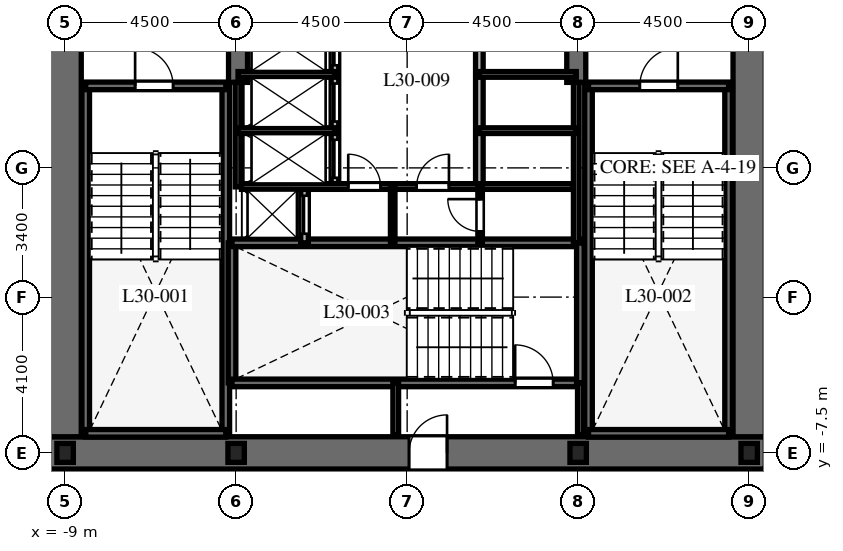
"""IFC4 building model, lengths in metres.
Left out: names, types, materials, properties, quantities, classifications, styles, units other than length and angle.
Written with IfcOpenShell. Run it as: python <this file> out.ifc"""

import sys

from ifc_helpers import new_model, si_unit, direction, frame, frame_2d, origin, origin_2d, place, context, subcontext, project, spatial, rectangle, i_section, extrude, element, fill, save


model = new_model("IFC4")
c1 = context("Model", 3, precision=1e-05, world=origin(), true_north=direction((0.0, 1.0)))
c2 = subcontext(c1, "Body", "Model", "MODEL_VIEW")
j1 = project(units=[si_unit("LENGTHUNIT", "METRE"), si_unit("PLANEANGLEUNIT", "RADIAN")], contexts=[c1])
p1 = place(None, origin())
s1 = spatial("IfcSite", under=j1, at=p1, CompositionType="ELEMENT")
p2 = place(p1, origin())
s2 = spatial("IfcBuilding", under=s1, at=p2, CompositionType="ELEMENT")
p3 = place(p2, frame((0.0, 0.0, 124.7)))
s3 = spatial("IfcBuildingStorey", under=s2, at=p3, CompositionType="ELEMENT", Elevation=124.7)
p4 = place(p3, frame((-9.425, -7.5, 0.0), z_axis=(0.0, 0.0, 1.0), x_axis=(1.0, 0.0, 0.0)))
e1 = element("IfcWall", 1, at=p4, inside=s3, PredefinedType="SHEAR", context=c2, shape_type="SweptSolid", body=[
    extrude(rectangle(XDim=18.85, YDim=0.85, at=frame_2d((9.425, 0.0))), origin(), (0.0, 0.0, 1.0), 3.7),
])
p5 = place(p4, frame((9.475, 0.0, 0.0)))
e2 = element("IfcOpeningElement", 2, at=p5, cuts=e1, PredefinedType="OPENING", context=c2, shape_type="SweptSolid", body=[
    extrude(rectangle(XDim=1.0, YDim=2.15, at=frame_2d((0.5, 1.075))), frame((0.0, 0.435, 0.0), z_axis=(0.0, -1.0, 0.0), x_axis=(1.0, 0.0, 0.0)), (0.0, 0.0, 1.0), 0.87),
])
p6 = place(p3, frame((-9.0, -7.075, 0.0), z_axis=(0.0, 0.0, 1.0), x_axis=(0.0, 1.0, 0.0)))
e3 = element("IfcWall", 3, at=p6, inside=s3, PredefinedType="SHEAR", context=c2, shape_type="SweptSolid", body=[
    extrude(rectangle(XDim=14.15, YDim=0.85, at=frame_2d((7.075, 0.0))), origin(), (0.0, 0.0, 1.0), 3.7),
])
p7 = place(p6, frame((10.2, 0.0, 0.0)))
e4 = element("IfcOpeningElement", 4, at=p7, cuts=e3, PredefinedType="OPENING", context=c2, shape_type="SweptSolid", body=[
    extrude(rectangle(XDim=1.05, YDim=2.15, at=frame_2d((0.525, 1.075))), frame((0.0, 0.435, 0.0), z_axis=(0.0, -1.0, 0.0), x_axis=(1.0, 0.0, 0.0)), (0.0, 0.0, 1.0), 0.87),
])
p8 = place(p3, frame((9.0, -7.075, 0.0), z_axis=(0.0, 0.0, 1.0), x_axis=(0.0, 1.0, 0.0)))
e5 = element("IfcWall", 5, at=p8, inside=s3, PredefinedType="SHEAR", context=c2, shape_type="SweptSolid", body=[
    extrude(rectangle(XDim=14.15, YDim=0.85, at=frame_2d((7.075, 0.0))), origin(), (0.0, 0.0, 1.0), 3.7),
])
p9 = place(p8, frame((10.2, 0.0, 0.0)))
e6 = element("IfcOpeningElement", 6, at=p9, cuts=e5, PredefinedType="OPENING", context=c2, shape_type="SweptSolid", body=[
    extrude(rectangle(XDim=1.05, YDim=2.15, at=frame_2d((0.525, 1.075))), frame((0.0, 0.435, 0.0), z_axis=(0.0, -1.0, 0.0), x_axis=(1.0, 0.0, 0.0)), (0.0, 0.0, 1.0), 0.87),
])
for number, where, z_axis, x_axis in (
    (7, (-4.45, 2.25, 0.0), (0.0, 0.0, 1.0), (0.0, 1.0, 0.0)),
    (8, (4.45, 2.25, 0.0), (0.0, 0.0, 1.0), (0.0, 1.0, 0.0)),
):
    element("IfcWall", number, at=place(p3, frame(where, z_axis=z_axis, x_axis=x_axis)), inside=s3, PredefinedType="SHEAR", context=c2, shape_type="SweptSolid", body=[
        extrude(rectangle(XDim=4.825, YDim=0.5, at=frame_2d((2.413, 0.0))), origin(), (0.0, 0.0, 1.0), 3.7),
    ])
for number, where, z_axis, x_axis in (
    (9, (-8.458, -6.985, 0.0), (0.0, 0.0, 1.0), (0.0, 1.0, 0.0)),
    (10, (-4.772, -6.985, 0.0), (0.0, 0.0, 1.0), (0.0, 1.0, 0.0)),
):
    element("IfcWall", number, at=place(p3, frame(where, z_axis=z_axis, x_axis=x_axis)), inside=s3, PredefinedType="SHEAR", context=c2, shape_type="SweptSolid", body=[
        extrude(rectangle(XDim=9.143, YDim=0.2, at=frame_2d((4.572, 0.0))), origin(), (0.0, 0.0, 1.0), 3.7),
    ])
p10 = place(p3, frame((-8.458, -6.985, 0.0), z_axis=(0.0, 0.0, 1.0), x_axis=(1.0, 0.0, 0.0)))
e11 = element("IfcWall", 11, at=p10, inside=s3, PredefinedType="SHEAR", context=c2, shape_type="SweptSolid", body=[
    extrude(rectangle(XDim=3.686, YDim=0.2, at=frame_2d((1.843, 0.0))), origin(), (0.0, 0.0, 1.0), 3.7),
])
p11 = place(p3, frame((-8.458, 2.158, 0.0), z_axis=(0.0, 0.0, 1.0), x_axis=(1.0, 0.0, 0.0)))
e12 = element("IfcWall", 12, at=p11, inside=s3, PredefinedType="SHEAR", context=c2, shape_type="SweptSolid", body=[
    extrude(rectangle(XDim=3.686, YDim=0.2, at=frame_2d((1.843, 0.0))), origin(), (0.0, 0.0, 1.0), 3.7),
])
p12 = place(p11, frame((1.3, 0.0, 0.0)))
e13 = element("IfcOpeningElement", 13, at=p12, cuts=e12, PredefinedType="OPENING", context=c2, shape_type="SweptSolid", body=[
    extrude(rectangle(XDim=1.0, YDim=2.15, at=frame_2d((0.5, 1.075))), frame((0.0, 0.11, 0.0), z_axis=(0.0, -1.0, 0.0), x_axis=(1.0, 0.0, 0.0)), (0.0, 0.0, 1.0), 0.22),
])
for number, where, z_axis, x_axis in (
    (14, (4.772, -6.985, 0.0), (0.0, 0.0, 1.0), (0.0, 1.0, 0.0)),
    (15, (8.458, -6.985, 0.0), (0.0, 0.0, 1.0), (0.0, 1.0, 0.0)),
):
    element("IfcWall", number, at=place(p3, frame(where, z_axis=z_axis, x_axis=x_axis)), inside=s3, PredefinedType="SHEAR", context=c2, shape_type="SweptSolid", body=[
        extrude(rectangle(XDim=9.143, YDim=0.2, at=frame_2d((4.572, 0.0))), origin(), (0.0, 0.0, 1.0), 3.7),
    ])
p13 = place(p3, frame((4.772, -6.985, 0.0), z_axis=(0.0, 0.0, 1.0), x_axis=(1.0, 0.0, 0.0)))
e16 = element("IfcWall", 16, at=p13, inside=s3, PredefinedType="SHEAR", context=c2, shape_type="SweptSolid", body=[
    extrude(rectangle(XDim=3.686, YDim=0.2, at=frame_2d((1.843, 0.0))), origin(), (0.0, 0.0, 1.0), 3.7),
])
p14 = place(p3, frame((4.772, 2.158, 0.0), z_axis=(0.0, 0.0, 1.0), x_axis=(1.0, 0.0, 0.0)))
e17 = element("IfcWall", 17, at=p14, inside=s3, PredefinedType="SHEAR", context=c2, shape_type="SweptSolid", body=[
    extrude(rectangle(XDim=3.686, YDim=0.2, at=frame_2d((1.843, 0.0))), origin(), (0.0, 0.0, 1.0), 3.7),
])
p15 = place(p14, frame((1.35, 0.0, 0.0)))
e18 = element("IfcOpeningElement", 18, at=p15, cuts=e17, PredefinedType="OPENING", context=c2, shape_type="SweptSolid", body=[
    extrude(rectangle(XDim=1.0, YDim=2.15, at=frame_2d((0.5, 1.075))), frame((0.0, 0.11, 0.0), z_axis=(0.0, -1.0, 0.0), x_axis=(1.0, 0.0, 0.0)), (0.0, 0.0, 1.0), 0.22),
])
p16 = place(p3, frame((-4.608, -5.658, 0.0), z_axis=(0.0, 0.0, 1.0), x_axis=(0.0, 1.0, 0.0)))
e19 = element("IfcWall", 19, at=p16, inside=s3, PredefinedType="SHEAR", context=c2, shape_type="SweptSolid", body=[
    extrude(rectangle(XDim=3.686, YDim=0.2, at=frame_2d((1.843, 0.0))), origin(), (0.0, 0.0, 1.0), 3.7),
])
p17 = place(p3, frame((-4.608, -5.658, 0.0), z_axis=(0.0, 0.0, 1.0), x_axis=(1.0, 0.0, 0.0)))
e20 = element("IfcWall", 20, at=p17, inside=s3, PredefinedType="SHEAR", context=c2, shape_type="SweptSolid", body=[
    extrude(rectangle(XDim=9.166, YDim=0.2, at=frame_2d((4.583, 0.0))), origin(), (0.0, 0.0, 1.0), 3.7),
])
p18 = place(p17, frame((7.45, 0.0, 0.0)))
e21 = element("IfcOpeningElement", 21, at=p18, cuts=e20, PredefinedType="OPENING", context=c2, shape_type="SweptSolid", body=[
    extrude(rectangle(XDim=1.0, YDim=2.15, at=frame_2d((0.5, 1.075))), frame((0.0, 0.11, 0.0), z_axis=(0.0, -1.0, 0.0), x_axis=(1.0, 0.0, 0.0)), (0.0, 0.0, 1.0), 0.22),
])
p19 = place(p3, frame((-4.608, -1.972, 0.0), z_axis=(0.0, 0.0, 1.0), x_axis=(1.0, 0.0, 0.0)))
e22 = element("IfcWall", 22, at=p19, inside=s3, PredefinedType="SHEAR", context=c2, shape_type="SweptSolid", body=[
    extrude(rectangle(XDim=9.166, YDim=0.2, at=frame_2d((4.583, 0.0))), origin(), (0.0, 0.0, 1.0), 3.7),
])
p20 = place(p3, frame((4.558, -5.658, 0.0), z_axis=(0.0, 0.0, 1.0), x_axis=(0.0, 1.0, 0.0)))
e23 = element("IfcWall", 23, at=p20, inside=s3, PredefinedType="SHEAR", context=c2, shape_type="SweptSolid", body=[
    extrude(rectangle(XDim=3.686, YDim=0.2, at=frame_2d((1.843, 0.0))), origin(), (0.0, 0.0, 1.0), 3.7),
])
for number, where, z_axis, x_axis in (
    (24, (-9.0, -7.5, 0.0), (0.0, 0.0, 1.0), (1.0, 0.0, 0.0)),
    (25, (-4.5, -7.5, 0.0), (0.0, 0.0, 1.0), (1.0, 0.0, 0.0)),
    (26, (4.5, -7.5, 0.0), (0.0, 0.0, 1.0), (1.0, 0.0, 0.0)),
    (27, (9.0, -7.5, 0.0), (0.0, 0.0, 1.0), (1.0, 0.0, 0.0)),
):
    element("IfcColumn", number, at=place(p3, frame(where, z_axis=z_axis, x_axis=x_axis)), inside=s3, PredefinedType="COLUMN", context=c2, shape_type="SweptSolid", body=[
        extrude(i_section(OverallWidth=0.432, OverallDepth=0.498, WebThickness=0.056, FlangeThickness=0.089, at=origin_2d()), origin(), (0.0, 0.0, 1.0), 3.7),
    ])
for number, where, z_axis, x_axis in (
    (28, (-0.3, -7.02, 0.0), (0.0, 0.0, 1.0), (0.0, 1.0, 0.0)),
    (29, (4.558, -7.02, 0.0), (0.0, 0.0, 1.0), (0.0, 1.0, 0.0)),
):
    element("IfcWall", number, at=place(p3, frame(where, z_axis=z_axis, x_axis=x_axis)), inside=s3, PredefinedType="PARTITIONING", context=c2, shape_type="SweptSolid", body=[
        extrude(rectangle(XDim=1.362, YDim=0.15, at=frame_2d((0.681, 0.0))), origin(), (0.0, 0.0, 1.0), 3.4),
    ])
p21 = place(p3, frame((-2.7, -1.972, 0.0), z_axis=(0.0, 0.0, 1.0), x_axis=(0.0, 1.0, 0.0)))
e30 = element("IfcWall", 30, at=p21, inside=s3, PredefinedType="PARTITIONING", context=c2, shape_type="SweptSolid", body=[
    extrude(rectangle(XDim=1.472, YDim=0.2, at=frame_2d((0.736, 0.0))), origin(), (0.0, 0.0, 1.0), 3.4),
])
p22 = place(p21, frame((0.24, 0.0, 0.0)))
e31 = element("IfcOpeningElement", 31, at=p22, cuts=e30, PredefinedType="OPENING", context=c2, shape_type="SweptSolid", body=[
    extrude(rectangle(XDim=1.0, YDim=2.2, at=frame_2d((0.5, 1.1))), frame((0.0, 0.11, 0.0), z_axis=(0.0, -1.0, 0.0), x_axis=(1.0, 0.0, 0.0)), (0.0, 0.0, 1.0), 0.22),
])
p23 = place(p3, frame((-4.45, -0.5, 0.0), z_axis=(0.0, 0.0, 1.0), x_axis=(0.0, 1.0, 0.0)))
e32 = element("IfcWall", 32, at=p23, inside=s3, PredefinedType="PARTITIONING", context=c2, shape_type="SweptSolid", body=[
    extrude(rectangle(XDim=2.75, YDim=0.15, at=frame_2d((1.375, 0.0))), origin(), (0.0, 0.0, 1.0), 3.4),
])
p24 = place(p3, frame((4.45, -1.972, 0.0), z_axis=(0.0, 0.0, 1.0), x_axis=(0.0, 1.0, 0.0)))
e33 = element("IfcWall", 33, at=p24, inside=s3, PredefinedType="PARTITIONING", context=c2, shape_type="SweptSolid", body=[
    extrude(rectangle(XDim=4.222, YDim=0.15, at=frame_2d((2.111, 0.0))), origin(), (0.0, 0.0, 1.0), 3.4),
])
p25 = place(p3, frame((-1.9, -0.5, 0.0), z_axis=(0.0, 0.0, 1.0), x_axis=(0.0, 1.0, 0.0)))
e34 = element("IfcWall", 34, at=p25, inside=s3, PredefinedType="PARTITIONING", context=c2, shape_type="SweptSolid", body=[
    extrude(rectangle(XDim=4.44, YDim=0.2, at=frame_2d((2.22, 0.0))), origin(), (0.0, 0.0, 1.0), 3.4),
])
p26 = place(p25, frame((0.24, 0.0, 0.0)))
e35 = element("IfcOpeningElement", 35, at=p26, cuts=e34, PredefinedType="OPENING", context=c2, shape_type="SweptSolid", body=[
    extrude(rectangle(XDim=1.0, YDim=2.2, at=frame_2d((0.5, 1.1))), frame((0.0, 0.11, 0.0), z_axis=(0.0, -1.0, 0.0), x_axis=(1.0, 0.0, 0.0)), (0.0, 0.0, 1.0), 0.22),
])
p27 = place(p25, frame((1.72, 0.0, 0.0)))
e36 = element("IfcOpeningElement", 36, at=p27, cuts=e34, PredefinedType="OPENING", context=c2, shape_type="SweptSolid", body=[
    extrude(rectangle(XDim=1.0, YDim=2.2, at=frame_2d((0.5, 1.1))), frame((0.0, 0.11, 0.0), z_axis=(0.0, -1.0, 0.0), x_axis=(1.0, 0.0, 0.0)), (0.0, 0.0, 1.0), 0.22),
])
p28 = place(p25, frame((3.2, 0.0, 0.0)))
e37 = element("IfcOpeningElement", 37, at=p28, cuts=e34, PredefinedType="OPENING", context=c2, shape_type="SweptSolid", body=[
    extrude(rectangle(XDim=1.0, YDim=2.2, at=frame_2d((0.5, 1.1))), frame((0.0, 0.11, 0.0), z_axis=(0.0, -1.0, 0.0), x_axis=(1.0, 0.0, 0.0)), (0.0, 0.0, 1.0), 0.22),
])
for number, where, z_axis, x_axis in (
    (38, (-4.45, 0.98, 0.0), (0.0, 0.0, 1.0), (1.0, 0.0, 0.0)),
    (39, (-4.45, 2.46, 0.0), (0.0, 0.0, 1.0), (1.0, 0.0, 0.0)),
):
    element("IfcWall", number, at=place(p3, frame(where, z_axis=z_axis, x_axis=x_axis)), inside=s3, PredefinedType="PARTITIONING", context=c2, shape_type="SweptSolid", body=[
        extrude(rectangle(XDim=2.55, YDim=0.15, at=frame_2d((1.275, 0.0))), origin(), (0.0, 0.0, 1.0), 3.4),
    ])
p29 = place(p3, frame((1.9, -0.5, 0.0), z_axis=(0.0, 0.0, 1.0), x_axis=(0.0, 1.0, 0.0)))
e40 = element("IfcWall", 40, at=p29, inside=s3, PredefinedType="PARTITIONING", context=c2, shape_type="SweptSolid", body=[
    extrude(rectangle(XDim=4.44, YDim=0.2, at=frame_2d((2.22, 0.0))), origin(), (0.0, 0.0, 1.0), 3.4),
])
for number, where, z_axis, x_axis in (
    (41, (1.9, 0.98, 0.0), (0.0, 0.0, 1.0), (1.0, 0.0, 0.0)),
    (42, (1.9, 2.46, 0.0), (0.0, 0.0, 1.0), (1.0, 0.0, 0.0)),
):
    element("IfcWall", number, at=place(p3, frame(where, z_axis=z_axis, x_axis=x_axis)), inside=s3, PredefinedType="PARTITIONING", context=c2, shape_type="SweptSolid", body=[
        extrude(rectangle(XDim=2.55, YDim=0.15, at=frame_2d((1.275, 0.0))), origin(), (0.0, 0.0, 1.0), 3.4),
    ])
p30 = place(p3, frame((-4.36, -0.49, 0.0), z_axis=(0.0, 0.0, 1.0), x_axis=(1.0, 0.0, 0.0)))
e43 = element("IfcWall", 43, at=p30, inside=s3, PredefinedType="PARTITIONING", context=c2, shape_type="SweptSolid", body=[
    extrude(rectangle(XDim=8.72, YDim=0.15, at=frame_2d((4.36, 0.0))), origin(), (0.0, 0.0, 1.0), 3.4),
])
p31 = place(p30, frame((2.81, 0.0, 0.0)))
e44 = element("IfcOpeningElement", 44, at=p31, cuts=e43, PredefinedType="OPENING", context=c2, shape_type="SweptSolid", body=[
    extrude(rectangle(XDim=0.85, YDim=2.03, at=frame_2d((0.425, 1.015))), frame((0.0, 0.085, 0.0), z_axis=(0.0, -1.0, 0.0), x_axis=(1.0, 0.0, 0.0)), (0.0, 0.0, 1.0), 0.17),
])
p32 = place(p30, frame((4.61, 0.0, 0.0)))
e45 = element("IfcOpeningElement", 45, at=p32, cuts=e43, PredefinedType="OPENING", context=c2, shape_type="SweptSolid", body=[
    extrude(rectangle(XDim=0.85, YDim=2.03, at=frame_2d((0.425, 1.015))), frame((0.0, 0.085, 0.0), z_axis=(0.0, -1.0, 0.0), x_axis=(1.0, 0.0, 0.0)), (0.0, 0.0, 1.0), 0.17),
])
p33 = place(p3, frame((-0.38, -1.972, 0.0), z_axis=(0.0, 0.0, 1.0), x_axis=(0.0, 1.0, 0.0)))
e46 = element("IfcWall", 46, at=p33, inside=s3, PredefinedType="PARTITIONING", context=c2, shape_type="SweptSolid", body=[
    extrude(rectangle(XDim=1.472, YDim=0.12, at=frame_2d((0.736, 0.0))), origin(), (0.0, 0.0, 1.0), 3.4),
])
p34 = place(p3, frame((1.92, -1.972, 0.0), z_axis=(0.0, 0.0, 1.0), x_axis=(0.0, 1.0, 0.0)))
e47 = element("IfcWall", 47, at=p34, inside=s3, PredefinedType="PARTITIONING", context=c2, shape_type="SweptSolid", body=[
    extrude(rectangle(XDim=1.472, YDim=0.12, at=frame_2d((0.736, 0.0))), origin(), (0.0, 0.0, 1.0), 3.4),
])
p35 = place(p34, frame((0.3, 0.0, 0.0)))
e48 = element("IfcOpeningElement", 48, at=p35, cuts=e47, PredefinedType="OPENING", context=c2, shape_type="SweptSolid", body=[
    extrude(rectangle(XDim=0.85, YDim=2.03, at=frame_2d((0.425, 1.015))), frame((0.0, 0.07, 0.0), z_axis=(0.0, -1.0, 0.0), x_axis=(1.0, 0.0, 0.0)), (0.0, 0.0, 1.0), 0.14),
])
p36 = place(p12, origin())
e49 = element("IfcDoor", 49, at=p36, inside=s3, OperationType="SINGLE_SWING_LEFT", PredefinedType="DOOR", context=c2, shape_type="SweptSolid", body=[
    extrude(rectangle(XDim=1.0, YDim=2.15, at=frame_2d((0.5, 1.075))), frame((0.0, 0.025, 0.0), z_axis=(0.0, -1.0, 0.0), x_axis=(1.0, 0.0, 0.0)), (0.0, 0.0, 1.0), 0.05),
])
fill(e13, e49)
p37 = place(p15, origin())
e50 = element("IfcDoor", 50, at=p37, inside=s3, OperationType="SINGLE_SWING_RIGHT", PredefinedType="DOOR", context=c2, shape_type="SweptSolid", body=[
    extrude(rectangle(XDim=1.0, YDim=2.15, at=frame_2d((0.5, 1.075))), frame((0.0, 0.025, 0.0), z_axis=(0.0, -1.0, 0.0), x_axis=(1.0, 0.0, 0.0)), (0.0, 0.0, 1.0), 0.05),
])
fill(e18, e50)
p38 = place(p18, origin())
e51 = element("IfcDoor", 51, at=p38, inside=s3, OperationType="SINGLE_SWING_LEFT", PredefinedType="DOOR", context=c2, shape_type="SweptSolid", body=[
    extrude(rectangle(XDim=1.0, YDim=2.15, at=frame_2d((0.5, 1.075))), frame((0.0, 0.025, 0.0), z_axis=(0.0, -1.0, 0.0), x_axis=(1.0, 0.0, 0.0)), (0.0, 0.0, 1.0), 0.05),
])
fill(e21, e51)
p39 = place(p5, origin())
e52 = element("IfcDoor", 52, at=p39, inside=s3, OperationType="SINGLE_SWING_RIGHT", PredefinedType="DOOR", context=c2, shape_type="SweptSolid", body=[
    extrude(rectangle(XDim=1.0, YDim=2.15, at=frame_2d((0.5, 1.075))), frame((0.0, 0.025, 0.0), z_axis=(0.0, -1.0, 0.0), x_axis=(1.0, 0.0, 0.0)), (0.0, 0.0, 1.0), 0.05),
])
fill(e2, e52)
p40 = place(p22, origin())
e53 = element("IfcDoor", 53, at=p40, inside=s3, OperationType="SLIDING_TO_LEFT", PredefinedType="DOOR", context=c2, shape_type="SweptSolid", body=[
    extrude(rectangle(XDim=1.0, YDim=2.2, at=frame_2d((0.5, 1.1))), frame((0.0, 0.025, 0.0), z_axis=(0.0, -1.0, 0.0), x_axis=(1.0, 0.0, 0.0)), (0.0, 0.0, 1.0), 0.05),
])
fill(e31, e53)
p41 = place(p26, origin())
e54 = element("IfcDoor", 54, at=p41, inside=s3, OperationType="SLIDING_TO_LEFT", PredefinedType="DOOR", context=c2, shape_type="SweptSolid", body=[
    extrude(rectangle(XDim=1.0, YDim=2.2, at=frame_2d((0.5, 1.1))), frame((0.0, 0.025, 0.0), z_axis=(0.0, -1.0, 0.0), x_axis=(1.0, 0.0, 0.0)), (0.0, 0.0, 1.0), 0.05),
])
fill(e35, e54)
p42 = place(p27, origin())
e55 = element("IfcDoor", 55, at=p42, inside=s3, OperationType="SLIDING_TO_LEFT", PredefinedType="DOOR", context=c2, shape_type="SweptSolid", body=[
    extrude(rectangle(XDim=1.0, YDim=2.2, at=frame_2d((0.5, 1.1))), frame((0.0, 0.025, 0.0), z_axis=(0.0, -1.0, 0.0), x_axis=(1.0, 0.0, 0.0)), (0.0, 0.0, 1.0), 0.05),
])
fill(e36, e55)
p43 = place(p28, origin())
e56 = element("IfcDoor", 56, at=p43, inside=s3, OperationType="SLIDING_TO_LEFT", PredefinedType="DOOR", context=c2, shape_type="SweptSolid", body=[
    extrude(rectangle(XDim=1.0, YDim=2.2, at=frame_2d((0.5, 1.1))), frame((0.0, 0.025, 0.0), z_axis=(0.0, -1.0, 0.0), x_axis=(1.0, 0.0, 0.0)), (0.0, 0.0, 1.0), 0.05),
])
fill(e37, e56)
p44 = place(p31, origin())
e57 = element("IfcDoor", 57, at=p44, inside=s3, OperationType="SINGLE_SWING_LEFT", PredefinedType="DOOR", context=c2, shape_type="SweptSolid", body=[
    extrude(rectangle(XDim=0.85, YDim=2.03, at=frame_2d((0.425, 1.015))), frame((0.0, 0.025, 0.0), z_axis=(0.0, -1.0, 0.0), x_axis=(1.0, 0.0, 0.0)), (0.0, 0.0, 1.0), 0.05),
])
fill(e44, e57)
p45 = place(p32, origin())
e58 = element("IfcDoor", 58, at=p45, inside=s3, OperationType="SINGLE_SWING_RIGHT", PredefinedType="DOOR", context=c2, shape_type="SweptSolid", body=[
    extrude(rectangle(XDim=0.85, YDim=2.03, at=frame_2d((0.425, 1.015))), frame((0.0, 0.025, 0.0), z_axis=(0.0, -1.0, 0.0), x_axis=(1.0, 0.0, 0.0)), (0.0, 0.0, 1.0), 0.05),
])
fill(e45, e58)
p46 = place(p35, origin())
e59 = element("IfcDoor", 59, at=p46, inside=s3, OperationType="SINGLE_SWING_RIGHT", PredefinedType="DOOR", context=c2, shape_type="SweptSolid", body=[
    extrude(rectangle(XDim=0.85, YDim=2.03, at=frame_2d((0.425, 1.015))), frame((0.0, 0.025, 0.0), z_axis=(0.0, -1.0, 0.0), x_axis=(1.0, 0.0, 0.0)), (0.0, 0.0, 1.0), 0.05),
])
fill(e48, e59)
save(model, sys.argv[1])
